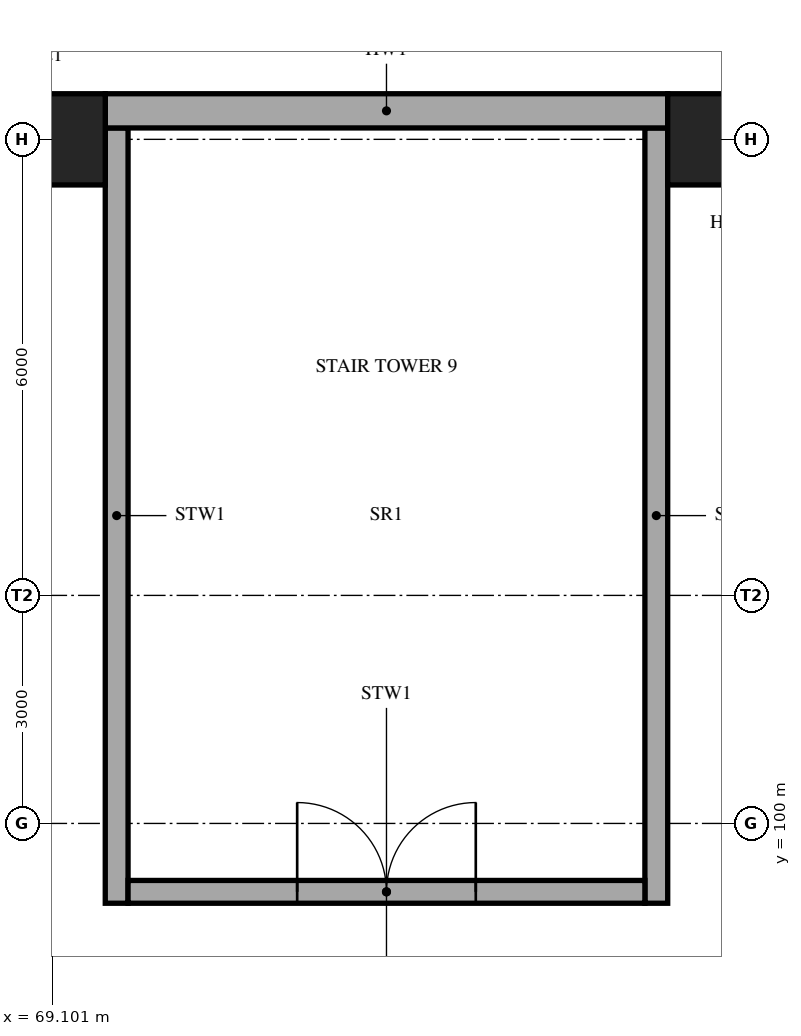
"""IFC4 building model, lengths in metres.
Left out: names, types, materials, properties, quantities, classifications, styles, units other than length and angle.
Written with IfcOpenShell. Run it as: python <this file> out.ifc"""

import sys

from ifc_helpers import new_model, si_unit, direction, frame, frame_2d, origin, origin_2d, place, context, subcontext, project, spatial, rectangle, extrude, element, fill, save


model = new_model("IFC4")
c1 = context("Model", 3, precision=1e-05, world=origin(), true_north=direction((0.0, 1.0)))
c2 = subcontext(c1, "Body", "Model", "MODEL_VIEW")
j1 = project(units=[si_unit("LENGTHUNIT", "METRE"), si_unit("PLANEANGLEUNIT", "RADIAN")], contexts=[c1])
p1 = place(None, origin())
s1 = spatial("IfcSite", under=j1, at=p1, CompositionType="ELEMENT")
p2 = place(p1, origin())
s2 = spatial("IfcBuilding", under=s1, at=p2, CompositionType="ELEMENT")
p3 = place(p2, frame((0.0, 0.0, 15.0)))
s3 = spatial("IfcBuildingStorey", under=s2, at=p3, CompositionType="ELEMENT", Elevation=15.0)
for number, where, z_axis, x_axis in (
    (1, (69.0, 109.0, 0.0), (0.0, 0.0, 1.0), (1.0, 0.0, 0.0)),
    (2, (78.0, 109.0, 0.0), (0.0, 0.0, 1.0), (1.0, 0.0, 0.0)),
):
    element("IfcColumn", number, at=place(p3, frame(where, z_axis=z_axis, x_axis=x_axis)), inside=s3, PredefinedType="COLUMN", context=c2, shape_type="SweptSolid", body=[
        extrude(rectangle(XDim=1.6, YDim=1.2, at=origin_2d()), origin(), (0.0, 0.0, 1.0), 4.2),
    ])
for number, where, z_axis, x_axis in (
    (3, (69.95, 109.15, 0.0), (0.0, 0.0, 1.0), (0.0, -1.0, 0.0)),
    (4, (77.05, 109.15, 0.0), (0.0, 0.0, 1.0), (0.0, -1.0, 0.0)),
):
    element("IfcWall", number, at=place(p3, frame(where, z_axis=z_axis, x_axis=x_axis)), inside=s3, PredefinedType="SHEAR", context=c2, shape_type="SweptSolid", body=[
        extrude(rectangle(XDim=10.2, YDim=0.3, at=frame_2d((5.1, 0.0))), origin(), (0.0, 0.0, 1.0), 3.9),
    ])
p4 = place(p3, frame((70.1, 99.1, 0.0), z_axis=(0.0, 0.0, 1.0), x_axis=(1.0, 0.0, 0.0)))
e5 = element("IfcWall", 5, at=p4, inside=s3, PredefinedType="SHEAR", context=c2, shape_type="SweptSolid", body=[
    extrude(rectangle(XDim=6.8, YDim=0.3, at=frame_2d((3.4, 0.0))), origin(), (0.0, 0.0, 1.0), 3.9),
])
p5 = place(p4, frame((2.225, 0.0, 0.0)))
e6 = element("IfcOpeningElement", 6, at=p5, cuts=e5, PredefinedType="OPENING", context=c2, shape_type="SweptSolid", body=[
    extrude(rectangle(XDim=2.35, YDim=2.1, at=frame_2d((1.175, 1.05))), frame((0.0, 0.16, 0.0), z_axis=(0.0, -1.0, 0.0), x_axis=(1.0, 0.0, 0.0)), (0.0, 0.0, 1.0), 0.32),
])
p6 = place(p3, frame((69.8, 109.375, 0.0), z_axis=(0.0, 0.0, 1.0), x_axis=(1.0, 0.0, 0.0)))
e7 = element("IfcWall", 7, at=p6, inside=s3, PredefinedType="SOLIDWALL", context=c2, shape_type="SweptSolid", body=[
    extrude(rectangle(XDim=7.4, YDim=0.45, at=frame_2d((3.7, 0.0))), origin(), (0.0, 0.0, 1.0), 4.2),
])
p7 = place(p5, origin())
e8 = element("IfcDoor", 8, at=p7, inside=s3, OperationType="DOUBLE_DOOR_SINGLE_SWING", PredefinedType="DOOR", context=c2, shape_type="SweptSolid", body=[
    extrude(rectangle(XDim=2.35, YDim=2.1, at=frame_2d((1.175, 1.05))), frame((0.0, 0.025, 0.0), z_axis=(0.0, -1.0, 0.0), x_axis=(1.0, 0.0, 0.0)), (0.0, 0.0, 1.0), 0.05),
])
fill(e6, e8)
save(model, sys.argv[1])
